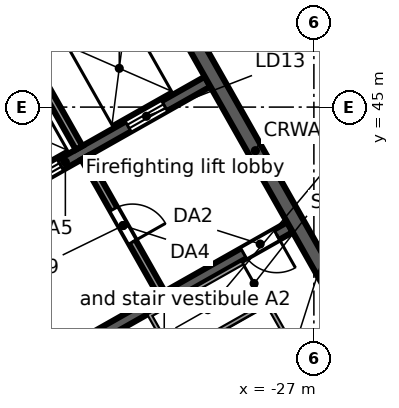
"""IFC4 building model, lengths in metres.
Left out: names, types, materials, properties, quantities, classifications, styles, units other than length and angle.
Written with IfcOpenShell. Run it as: python <this file> out.ifc"""

import sys

from ifc_helpers import new_model, si_unit, direction, frame, frame_2d, origin, place, context, subcontext, project, spatial, rectangle, extrude, element, fill, save


model = new_model("IFC4")
c1 = context("Model", 3, precision=1e-05, world=origin(), true_north=direction((0.0, 1.0)))
c2 = subcontext(c1, "Body", "Model", "MODEL_VIEW")
j1 = project(units=[si_unit("LENGTHUNIT", "METRE"), si_unit("PLANEANGLEUNIT", "RADIAN")], contexts=[c1])
p1 = place(None, origin())
s1 = spatial("IfcSite", under=j1, at=p1, CompositionType="ELEMENT")
p2 = place(p1, origin())
s2 = spatial("IfcBuilding", under=s1, at=p2, CompositionType="ELEMENT")
p3 = place(p2, frame((0.0, 0.0, 300.7)))
s3 = spatial("IfcBuildingStorey", under=s2, at=p3, CompositionType="ELEMENT", Elevation=300.7)
p4 = place(p3, frame((-58.732, 38.771, 0.0), z_axis=(0.0, 0.0, 1.0), x_axis=(0.870355615581, 0.492423702137, 0.0)))
e1 = element("IfcWall", 1, at=p4, inside=s3, PredefinedType="STANDARD", context=c2, shape_type="SweptSolid", body=[
    extrude(rectangle(XDim=64.052, YDim=0.25, at=frame_2d((32.026, 0.0))), origin(), (0.0, 0.0, 1.0), 3.52),
])
p5 = place(p4, frame((61.259, 0.0, 0.8)))
e2 = element("IfcOpeningElement", 2, at=p5, cuts=e1, PredefinedType="OPENING", context=c2, shape_type="SweptSolid", body=[
    extrude(rectangle(XDim=2.4, YDim=2.2, at=frame_2d((1.2, 1.1))), frame((0.0, 0.135, 0.0), z_axis=(0.0, -1.0, 0.0), x_axis=(1.0, 0.0, 0.0)), (0.0, 0.0, 1.0), 0.27),
])
p6 = place(p4, frame((58.216, 0.0, 0.8)))
e3 = element("IfcOpeningElement", 3, at=p6, cuts=e1, PredefinedType="OPENING", context=c2, shape_type="SweptSolid", body=[
    extrude(rectangle(XDim=2.4, YDim=2.2, at=frame_2d((1.2, 1.1))), frame((0.0, 0.135, 0.0), z_axis=(0.0, -1.0, 0.0), x_axis=(1.0, 0.0, 0.0)), (0.0, 0.0, 1.0), 0.27),
])
p7 = place(p4, frame((55.173, 0.0, 0.8)))
e4 = element("IfcOpeningElement", 4, at=p7, cuts=e1, PredefinedType="OPENING", context=c2, shape_type="SweptSolid", body=[
    extrude(rectangle(XDim=2.4, YDim=2.2, at=frame_2d((1.2, 1.1))), frame((0.0, 0.135, 0.0), z_axis=(0.0, -1.0, 0.0), x_axis=(1.0, 0.0, 0.0)), (0.0, 0.0, 1.0), 0.27),
])
p8 = place(p4, frame((52.129, 0.0, 0.8)))
e5 = element("IfcOpeningElement", 5, at=p8, cuts=e1, PredefinedType="OPENING", context=c2, shape_type="SweptSolid", body=[
    extrude(rectangle(XDim=2.4, YDim=2.2, at=frame_2d((1.2, 1.1))), frame((0.0, 0.135, 0.0), z_axis=(0.0, -1.0, 0.0), x_axis=(1.0, 0.0, 0.0)), (0.0, 0.0, 1.0), 0.27),
])
p9 = place(p4, frame((49.086, 0.0, 0.8)))
e6 = element("IfcOpeningElement", 6, at=p9, cuts=e1, PredefinedType="OPENING", context=c2, shape_type="SweptSolid", body=[
    extrude(rectangle(XDim=2.4, YDim=2.2, at=frame_2d((1.2, 1.1))), frame((0.0, 0.135, 0.0), z_axis=(0.0, -1.0, 0.0), x_axis=(1.0, 0.0, 0.0)), (0.0, 0.0, 1.0), 0.27),
])
p10 = place(p4, frame((46.043, 0.0, 0.8)))
e7 = element("IfcOpeningElement", 7, at=p10, cuts=e1, PredefinedType="OPENING", context=c2, shape_type="SweptSolid", body=[
    extrude(rectangle(XDim=2.4, YDim=2.2, at=frame_2d((1.2, 1.1))), frame((0.0, 0.135, 0.0), z_axis=(0.0, -1.0, 0.0), x_axis=(1.0, 0.0, 0.0)), (0.0, 0.0, 1.0), 0.27),
])
p11 = place(p4, frame((43.0, 0.0, 0.8)))
e8 = element("IfcOpeningElement", 8, at=p11, cuts=e1, PredefinedType="OPENING", context=c2, shape_type="SweptSolid", body=[
    extrude(rectangle(XDim=2.4, YDim=2.2, at=frame_2d((1.2, 1.1))), frame((0.0, 0.135, 0.0), z_axis=(0.0, -1.0, 0.0), x_axis=(1.0, 0.0, 0.0)), (0.0, 0.0, 1.0), 0.27),
])
p12 = place(p4, frame((39.956, 0.0, 0.8)))
e9 = element("IfcOpeningElement", 9, at=p12, cuts=e1, PredefinedType="OPENING", context=c2, shape_type="SweptSolid", body=[
    extrude(rectangle(XDim=2.4, YDim=2.2, at=frame_2d((1.2, 1.1))), frame((0.0, 0.135, 0.0), z_axis=(0.0, -1.0, 0.0), x_axis=(1.0, 0.0, 0.0)), (0.0, 0.0, 1.0), 0.27),
])
p13 = place(p4, frame((36.913, 0.0, 0.8)))
e10 = element("IfcOpeningElement", 10, at=p13, cuts=e1, PredefinedType="OPENING", context=c2, shape_type="SweptSolid", body=[
    extrude(rectangle(XDim=2.4, YDim=2.2, at=frame_2d((1.2, 1.1))), frame((0.0, 0.135, 0.0), z_axis=(0.0, -1.0, 0.0), x_axis=(1.0, 0.0, 0.0)), (0.0, 0.0, 1.0), 0.27),
])
p14 = place(p4, frame((33.87, 0.0, 0.8)))
e11 = element("IfcOpeningElement", 11, at=p14, cuts=e1, PredefinedType="OPENING", context=c2, shape_type="SweptSolid", body=[
    extrude(rectangle(XDim=2.4, YDim=2.2, at=frame_2d((1.2, 1.1))), frame((0.0, 0.135, 0.0), z_axis=(0.0, -1.0, 0.0), x_axis=(1.0, 0.0, 0.0)), (0.0, 0.0, 1.0), 0.27),
])
p15 = place(p4, frame((30.826, 0.0, 0.8)))
e12 = element("IfcOpeningElement", 12, at=p15, cuts=e1, PredefinedType="OPENING", context=c2, shape_type="SweptSolid", body=[
    extrude(rectangle(XDim=2.4, YDim=2.2, at=frame_2d((1.2, 1.1))), frame((0.0, 0.135, 0.0), z_axis=(0.0, -1.0, 0.0), x_axis=(1.0, 0.0, 0.0)), (0.0, 0.0, 1.0), 0.27),
])
p16 = place(p4, frame((27.783, 0.0, 0.8)))
e13 = element("IfcOpeningElement", 13, at=p16, cuts=e1, PredefinedType="OPENING", context=c2, shape_type="SweptSolid", body=[
    extrude(rectangle(XDim=2.4, YDim=2.2, at=frame_2d((1.2, 1.1))), frame((0.0, 0.135, 0.0), z_axis=(0.0, -1.0, 0.0), x_axis=(1.0, 0.0, 0.0)), (0.0, 0.0, 1.0), 0.27),
])
p17 = place(p4, frame((24.74, 0.0, 0.8)))
e14 = element("IfcOpeningElement", 14, at=p17, cuts=e1, PredefinedType="OPENING", context=c2, shape_type="SweptSolid", body=[
    extrude(rectangle(XDim=2.4, YDim=2.2, at=frame_2d((1.2, 1.1))), frame((0.0, 0.135, 0.0), z_axis=(0.0, -1.0, 0.0), x_axis=(1.0, 0.0, 0.0)), (0.0, 0.0, 1.0), 0.27),
])
p18 = place(p4, frame((21.696, 0.0, 0.8)))
e15 = element("IfcOpeningElement", 15, at=p18, cuts=e1, PredefinedType="OPENING", context=c2, shape_type="SweptSolid", body=[
    extrude(rectangle(XDim=2.4, YDim=2.2, at=frame_2d((1.2, 1.1))), frame((0.0, 0.135, 0.0), z_axis=(0.0, -1.0, 0.0), x_axis=(1.0, 0.0, 0.0)), (0.0, 0.0, 1.0), 0.27),
])
p19 = place(p4, frame((18.653, 0.0, 0.8)))
e16 = element("IfcOpeningElement", 16, at=p19, cuts=e1, PredefinedType="OPENING", context=c2, shape_type="SweptSolid", body=[
    extrude(rectangle(XDim=2.4, YDim=2.2, at=frame_2d((1.2, 1.1))), frame((0.0, 0.135, 0.0), z_axis=(0.0, -1.0, 0.0), x_axis=(1.0, 0.0, 0.0)), (0.0, 0.0, 1.0), 0.27),
])
p20 = place(p4, frame((15.61, 0.0, 0.8)))
e17 = element("IfcOpeningElement", 17, at=p20, cuts=e1, PredefinedType="OPENING", context=c2, shape_type="SweptSolid", body=[
    extrude(rectangle(XDim=2.4, YDim=2.2, at=frame_2d((1.2, 1.1))), frame((0.0, 0.135, 0.0), z_axis=(0.0, -1.0, 0.0), x_axis=(1.0, 0.0, 0.0)), (0.0, 0.0, 1.0), 0.27),
])
p21 = place(p4, frame((12.567, 0.0, 0.8)))
e18 = element("IfcOpeningElement", 18, at=p21, cuts=e1, PredefinedType="OPENING", context=c2, shape_type="SweptSolid", body=[
    extrude(rectangle(XDim=2.4, YDim=2.2, at=frame_2d((1.2, 1.1))), frame((0.0, 0.135, 0.0), z_axis=(0.0, -1.0, 0.0), x_axis=(1.0, 0.0, 0.0)), (0.0, 0.0, 1.0), 0.27),
])
p22 = place(p4, frame((9.523, 0.0, 0.8)))
e19 = element("IfcOpeningElement", 19, at=p22, cuts=e1, PredefinedType="OPENING", context=c2, shape_type="SweptSolid", body=[
    extrude(rectangle(XDim=2.4, YDim=2.2, at=frame_2d((1.2, 1.1))), frame((0.0, 0.135, 0.0), z_axis=(0.0, -1.0, 0.0), x_axis=(1.0, 0.0, 0.0)), (0.0, 0.0, 1.0), 0.27),
])
p23 = place(p4, frame((6.48, 0.0, 0.8)))
e20 = element("IfcOpeningElement", 20, at=p23, cuts=e1, PredefinedType="OPENING", context=c2, shape_type="SweptSolid", body=[
    extrude(rectangle(XDim=2.4, YDim=2.2, at=frame_2d((1.2, 1.1))), frame((0.0, 0.135, 0.0), z_axis=(0.0, -1.0, 0.0), x_axis=(1.0, 0.0, 0.0)), (0.0, 0.0, 1.0), 0.27),
])
p24 = place(p4, frame((3.437, 0.0, 0.8)))
e21 = element("IfcOpeningElement", 21, at=p24, cuts=e1, PredefinedType="OPENING", context=c2, shape_type="SweptSolid", body=[
    extrude(rectangle(XDim=2.4, YDim=2.2, at=frame_2d((1.2, 1.1))), frame((0.0, 0.135, 0.0), z_axis=(0.0, -1.0, 0.0), x_axis=(1.0, 0.0, 0.0)), (0.0, 0.0, 1.0), 0.27),
])
p25 = place(p4, frame((0.393, 0.0, 0.8)))
e22 = element("IfcOpeningElement", 22, at=p25, cuts=e1, PredefinedType="OPENING", context=c2, shape_type="SweptSolid", body=[
    extrude(rectangle(XDim=2.4, YDim=2.2, at=frame_2d((1.2, 1.1))), frame((0.0, 0.135, 0.0), z_axis=(0.0, -1.0, 0.0), x_axis=(1.0, 0.0, 0.0)), (0.0, 0.0, 1.0), 0.27),
])
p26 = place(p3, frame((-3.017, 46.293, 0.0), z_axis=(0.0, 0.0, 1.0), x_axis=(-0.870355474887, -0.492423950812, 0.0)))
e23 = element("IfcWall", 23, at=p26, inside=s3, PredefinedType="STANDARD", context=c2, shape_type="SweptSolid", body=[
    extrude(rectangle(XDim=40.34, YDim=0.25, at=frame_2d((20.17, 0.0))), origin(), (0.0, 0.0, 1.0), 3.52),
])
p27 = place(p26, frame((37.428, 0.0, 0.8)))
e24 = element("IfcOpeningElement", 24, at=p27, cuts=e23, PredefinedType="OPENING", context=c2, shape_type="SweptSolid", body=[
    extrude(rectangle(XDim=2.4, YDim=2.2, at=frame_2d((1.2, 1.1))), frame((0.0, 0.135, 0.0), z_axis=(0.0, -1.0, 0.0), x_axis=(1.0, 0.0, 0.0)), (0.0, 0.0, 1.0), 0.27),
])
p28 = place(p26, frame((34.372, 0.0, 0.0)))
e25 = element("IfcOpeningElement", 25, at=p28, cuts=e23, PredefinedType="OPENING", context=c2, shape_type="SweptSolid", body=[
    extrude(rectangle(XDim=1.8, YDim=2.4, at=frame_2d((0.9, 1.2))), frame((0.0, 0.135, 0.0), z_axis=(0.0, -1.0, 0.0), x_axis=(1.0, 0.0, 0.0)), (0.0, 0.0, 1.0), 0.27),
])
p29 = place(p26, frame((30.716, 0.0, 0.8)))
e26 = element("IfcOpeningElement", 26, at=p29, cuts=e23, PredefinedType="OPENING", context=c2, shape_type="SweptSolid", body=[
    extrude(rectangle(XDim=2.4, YDim=2.2, at=frame_2d((1.2, 1.1))), frame((0.0, 0.135, 0.0), z_axis=(0.0, -1.0, 0.0), x_axis=(1.0, 0.0, 0.0)), (0.0, 0.0, 1.0), 0.27),
])
p30 = place(p26, frame((27.36, 0.0, 0.8)))
e27 = element("IfcOpeningElement", 27, at=p30, cuts=e23, PredefinedType="OPENING", context=c2, shape_type="SweptSolid", body=[
    extrude(rectangle(XDim=2.4, YDim=2.2, at=frame_2d((1.2, 1.1))), frame((0.0, 0.135, 0.0), z_axis=(0.0, -1.0, 0.0), x_axis=(1.0, 0.0, 0.0)), (0.0, 0.0, 1.0), 0.27),
])
p31 = place(p26, frame((24.304, 0.0, 0.0)))
e28 = element("IfcOpeningElement", 28, at=p31, cuts=e23, PredefinedType="OPENING", context=c2, shape_type="SweptSolid", body=[
    extrude(rectangle(XDim=1.8, YDim=2.4, at=frame_2d((0.9, 1.2))), frame((0.0, 0.135, 0.0), z_axis=(0.0, -1.0, 0.0), x_axis=(1.0, 0.0, 0.0)), (0.0, 0.0, 1.0), 0.27),
])
p32 = place(p26, frame((20.648, 0.0, 0.8)))
e29 = element("IfcOpeningElement", 29, at=p32, cuts=e23, PredefinedType="OPENING", context=c2, shape_type="SweptSolid", body=[
    extrude(rectangle(XDim=2.4, YDim=2.2, at=frame_2d((1.2, 1.1))), frame((0.0, 0.135, 0.0), z_axis=(0.0, -1.0, 0.0), x_axis=(1.0, 0.0, 0.0)), (0.0, 0.0, 1.0), 0.27),
])
p33 = place(p26, frame((17.292, 0.0, 0.8)))
e30 = element("IfcOpeningElement", 30, at=p33, cuts=e23, PredefinedType="OPENING", context=c2, shape_type="SweptSolid", body=[
    extrude(rectangle(XDim=2.4, YDim=2.2, at=frame_2d((1.2, 1.1))), frame((0.0, 0.135, 0.0), z_axis=(0.0, -1.0, 0.0), x_axis=(1.0, 0.0, 0.0)), (0.0, 0.0, 1.0), 0.27),
])
p34 = place(p26, frame((14.236, 0.0, 0.0)))
e31 = element("IfcOpeningElement", 31, at=p34, cuts=e23, PredefinedType="OPENING", context=c2, shape_type="SweptSolid", body=[
    extrude(rectangle(XDim=1.8, YDim=2.4, at=frame_2d((0.9, 1.2))), frame((0.0, 0.135, 0.0), z_axis=(0.0, -1.0, 0.0), x_axis=(1.0, 0.0, 0.0)), (0.0, 0.0, 1.0), 0.27),
])
p35 = place(p26, frame((10.58, 0.0, 0.8)))
e32 = element("IfcOpeningElement", 32, at=p35, cuts=e23, PredefinedType="OPENING", context=c2, shape_type="SweptSolid", body=[
    extrude(rectangle(XDim=2.4, YDim=2.2, at=frame_2d((1.2, 1.1))), frame((0.0, 0.135, 0.0), z_axis=(0.0, -1.0, 0.0), x_axis=(1.0, 0.0, 0.0)), (0.0, 0.0, 1.0), 0.27),
])
p36 = place(p26, frame((7.224, 0.0, 0.8)))
e33 = element("IfcOpeningElement", 33, at=p36, cuts=e23, PredefinedType="OPENING", context=c2, shape_type="SweptSolid", body=[
    extrude(rectangle(XDim=2.4, YDim=2.2, at=frame_2d((1.2, 1.1))), frame((0.0, 0.135, 0.0), z_axis=(0.0, -1.0, 0.0), x_axis=(1.0, 0.0, 0.0)), (0.0, 0.0, 1.0), 0.27),
])
p37 = place(p26, frame((4.168, 0.0, 0.0)))
e34 = element("IfcOpeningElement", 34, at=p37, cuts=e23, PredefinedType="OPENING", context=c2, shape_type="SweptSolid", body=[
    extrude(rectangle(XDim=1.8, YDim=2.4, at=frame_2d((0.9, 1.2))), frame((0.0, 0.135, 0.0), z_axis=(0.0, -1.0, 0.0), x_axis=(1.0, 0.0, 0.0)), (0.0, 0.0, 1.0), 0.27),
])
p38 = place(p26, frame((0.512, 0.0, 0.8)))
e35 = element("IfcOpeningElement", 35, at=p38, cuts=e23, PredefinedType="OPENING", context=c2, shape_type="SweptSolid", body=[
    extrude(rectangle(XDim=2.4, YDim=2.2, at=frame_2d((1.2, 1.1))), frame((0.0, 0.135, 0.0), z_axis=(0.0, -1.0, 0.0), x_axis=(1.0, 0.0, 0.0)), (0.0, 0.0, 1.0), 0.27),
])
p39 = place(p3, frame((-34.245, 38.097, 0.0), z_axis=(0.0, 0.0, 1.0), x_axis=(0.870356351998, 0.492422400523, 0.0)))
e36 = element("IfcWall", 36, at=p39, inside=s3, PredefinedType="SOLIDWALL", context=c2, shape_type="SweptSolid", body=[
    extrude(rectangle(XDim=7.6, YDim=0.3, at=frame_2d((3.8, 0.0))), origin(), (0.0, 0.0, 1.0), 3.52),
])
p40 = place(p39, frame((6.2, 0.0, 0.0)))
e37 = element("IfcOpeningElement", 37, at=p40, cuts=e36, PredefinedType="OPENING", context=c2, shape_type="SweptSolid", body=[
    extrude(rectangle(XDim=1.0, YDim=2.1, at=frame_2d((0.5, 1.05))), frame((0.0, 0.16, 0.0), z_axis=(0.0, -1.0, 0.0), x_axis=(1.0, 0.0, 0.0)), (0.0, 0.0, 1.0), 0.32),
])
p41 = place(p3, frame((-37.282, 41.435, 0.0), z_axis=(0.0, 0.0, 1.0), x_axis=(0.870361315115, 0.492413628113, 0.0)))
e38 = element("IfcWall", 38, at=p41, inside=s3, PredefinedType="SOLIDWALL", context=c2, shape_type="SweptSolid", body=[
    extrude(rectangle(XDim=8.6, YDim=0.3, at=frame_2d((4.3, 0.0))), origin(), (0.0, 0.0, 1.0), 3.52),
])
p42 = place(p41, frame((0.65, 0.0, 0.0)))
e39 = element("IfcOpeningElement", 39, at=p42, cuts=e38, PredefinedType="OPENING", context=c2, shape_type="SweptSolid", body=[
    extrude(rectangle(XDim=1.1, YDim=2.1, at=frame_2d((0.55, 1.05))), frame((0.0, 0.16, 0.0), z_axis=(0.0, -1.0, 0.0), x_axis=(1.0, 0.0, 0.0)), (0.0, 0.0, 1.0), 0.32),
])
p43 = place(p41, frame((3.05, 0.0, 0.0)))
e40 = element("IfcOpeningElement", 40, at=p43, cuts=e38, PredefinedType="OPENING", context=c2, shape_type="SweptSolid", body=[
    extrude(rectangle(XDim=1.1, YDim=2.1, at=frame_2d((0.55, 1.05))), frame((0.0, 0.16, 0.0), z_axis=(0.0, -1.0, 0.0), x_axis=(1.0, 0.0, 0.0)), (0.0, 0.0, 1.0), 0.32),
])
p44 = place(p41, frame((6.2, 0.0, 0.0)))
e41 = element("IfcOpeningElement", 41, at=p44, cuts=e38, PredefinedType="OPENING", context=c2, shape_type="SweptSolid", body=[
    extrude(rectangle(XDim=1.1, YDim=2.1, at=frame_2d((0.55, 1.05))), frame((0.0, 0.16, 0.0), z_axis=(0.0, -1.0, 0.0), x_axis=(1.0, 0.0, 0.0)), (0.0, 0.0, 1.0), 0.32),
])
p45 = place(p3, frame((-46.51, 41.499, 0.0), z_axis=(0.0, 0.0, 1.0), x_axis=(0.870356271124, 0.492422543467, 0.0)))
e42 = element("IfcWall", 42, at=p45, inside=s3, PredefinedType="SOLIDWALL", context=c2, shape_type="SweptSolid", body=[
    extrude(rectangle(XDim=17.0, YDim=0.4, at=frame_2d((8.5, 0.0))), origin(), (0.0, 0.0, 1.0), 3.52),
])
p46 = place(p3, frame((-33.031, 43.667, 0.0), z_axis=(0.0, 0.0, 1.0), x_axis=(0.492408451753, -0.87036424366, 0.0)))
e43 = element("IfcWall", 43, at=p46, inside=s3, PredefinedType="PARTITIONING", context=c2, shape_type="SweptSolid", body=[
    extrude(rectangle(XDim=4.1, YDim=0.2, at=frame_2d((2.05, 0.0))), origin(), (0.0, 0.0, 1.0), 3.52),
])
p47 = place(p46, frame((1.55, 0.0, 0.0)))
e44 = element("IfcOpeningElement", 44, at=p47, cuts=e43, PredefinedType="OPENING", context=c2, shape_type="SweptSolid", body=[
    extrude(rectangle(XDim=1.0, YDim=2.1, at=frame_2d((0.5, 1.05))), frame((0.0, 0.11, 0.0), z_axis=(0.0, -1.0, 0.0), x_axis=(1.0, 0.0, 0.0)), (0.0, 0.0, 1.0), 0.22),
])
p48 = place(p3, frame((-35.271, 47.628, 0.0), z_axis=(0.0, 0.0, 1.0), x_axis=(0.492422543467, -0.870356271124, 0.0)))
e45 = element("IfcWall", 45, at=p48, inside=s3, PredefinedType="SOLIDWALL", context=c2, shape_type="SweptSolid", body=[
    extrude(rectangle(XDim=4.25, YDim=0.2, at=frame_2d((2.125, 0.0))), origin(), (0.0, 0.0, 1.0), 3.52),
])
p49 = place(p3, frame((-31.79, 49.597, 0.0), z_axis=(0.0, 0.0, 1.0), x_axis=(0.492421663121, -0.870356769198, 0.0)))
e46 = element("IfcWall", 46, at=p49, inside=s3, PredefinedType="SOLIDWALL", context=c2, shape_type="SweptSolid", body=[
    extrude(rectangle(XDim=13.2, YDim=0.4, at=frame_2d((6.6, 0.0))), origin(), (0.0, 0.0, 1.0), 3.52),
])
p50 = place(p43, origin())
e47 = element("IfcDoor", 47, at=p50, inside=s3, OperationType="DOUBLE_DOOR_SLIDING", PredefinedType="DOOR", context=c2, shape_type="SweptSolid", body=[
    extrude(rectangle(XDim=1.1, YDim=2.1, at=frame_2d((0.55, 1.05))), frame((0.0, 0.025, 0.0), z_axis=(0.0, -1.0, 0.0), x_axis=(1.0, 0.0, 0.0)), (0.0, 0.0, 1.0), 0.05),
])
fill(e40, e47)
p51 = place(p44, origin())
e48 = element("IfcDoor", 48, at=p51, inside=s3, OperationType="DOUBLE_DOOR_SLIDING", PredefinedType="DOOR", context=c2, shape_type="SweptSolid", body=[
    extrude(rectangle(XDim=1.1, YDim=2.1, at=frame_2d((0.55, 1.05))), frame((0.0, 0.025, 0.0), z_axis=(0.0, -1.0, 0.0), x_axis=(1.0, 0.0, 0.0)), (0.0, 0.0, 1.0), 0.05),
])
fill(e41, e48)
p52 = place(p40, frame((1.0, 0.0, 0.0), z_axis=(0.0, 0.0, 1.0), x_axis=(-1.0, 0.0, 0.0)))
e49 = element("IfcDoor", 49, at=p52, inside=s3, OperationType="SINGLE_SWING_LEFT", PredefinedType="DOOR", context=c2, shape_type="SweptSolid", body=[
    extrude(rectangle(XDim=1.0, YDim=2.1, at=frame_2d((0.5, 1.05))), frame((0.0, 0.025, 0.0), z_axis=(0.0, -1.0, 0.0), x_axis=(1.0, 0.0, 0.0)), (0.0, 0.0, 1.0), 0.05),
])
fill(e37, e49)
p53 = place(p47, origin())
e50 = element("IfcDoor", 50, at=p53, inside=s3, OperationType="SINGLE_SWING_RIGHT", PredefinedType="DOOR", context=c2, shape_type="SweptSolid", body=[
    extrude(rectangle(XDim=1.0, YDim=2.1, at=frame_2d((0.5, 1.05))), frame((0.0, 0.025, 0.0), z_axis=(0.0, -1.0, 0.0), x_axis=(1.0, 0.0, 0.0)), (0.0, 0.0, 1.0), 0.05),
])
fill(e44, e50)
save(model, sys.argv[1])
